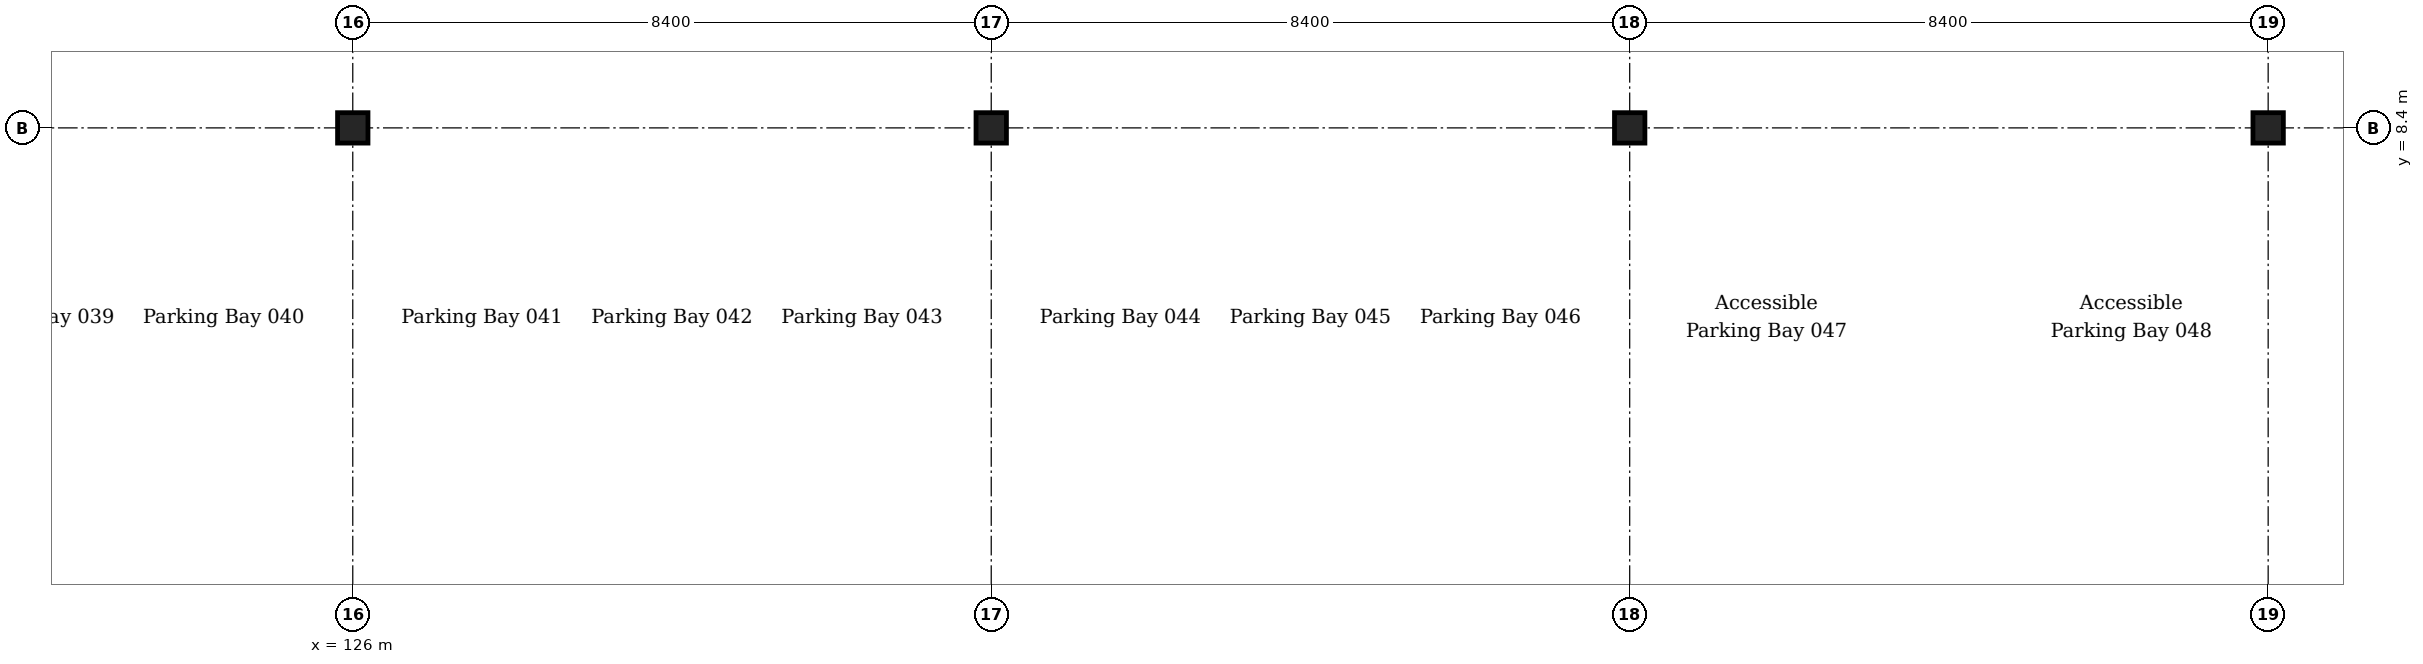
"""IFC4 building model, lengths in metres.
Left out: names, types, materials, properties, quantities, classifications, styles, units other than length and angle.
Written with IfcOpenShell. Run it as: python <this file> out.ifc"""

import sys

from ifc_helpers import new_model, si_unit, direction, frame, origin, origin_2d, place, context, subcontext, project, spatial, i_section, extrude, element, save


model = new_model("IFC4")
c1 = context("Model", 3, precision=1e-05, world=origin(), true_north=direction((0.0, 1.0)))
c2 = subcontext(c1, "Body", "Model", "MODEL_VIEW")
j1 = project(units=[si_unit("LENGTHUNIT", "METRE"), si_unit("PLANEANGLEUNIT", "RADIAN")], contexts=[c1])
p1 = place(None, origin())
s1 = spatial("IfcSite", under=j1, at=p1, CompositionType="ELEMENT")
p2 = place(p1, origin())
s2 = spatial("IfcBuilding", under=s1, at=p2, CompositionType="ELEMENT")
p3 = place(p2, frame((0.0, 0.0, -5.4)))
s3 = spatial("IfcBuildingStorey", under=s2, at=p3, CompositionType="ELEMENT", Elevation=-5.4)
for number, where, z_axis, x_axis in (
    (1, (126.0, 8.4, 0.0), (0.0, 0.0, 1.0), (1.0, 0.0, 0.0)),
    (2, (134.4, 8.4, 0.0), (0.0, 0.0, 1.0), (1.0, 0.0, 0.0)),
    (3, (142.8, 8.4, 0.0), (0.0, 0.0, 1.0), (1.0, 0.0, 0.0)),
    (4, (151.2, 8.4, 0.0), (0.0, 0.0, 1.0), (1.0, 0.0, 0.0)),
):
    element("IfcColumn", number, at=place(p3, frame(where, z_axis=z_axis, x_axis=x_axis)), inside=s3, PredefinedType="COLUMN", context=c2, shape_type="SweptSolid", body=[
        extrude(i_section(OverallWidth=0.4, OverallDepth=0.4, WebThickness=0.013, FlangeThickness=0.021, FilletRadius=0.022, at=origin_2d()), origin(), (0.0, 0.0, 1.0), 5.4),
    ])
save(model, sys.argv[1])
